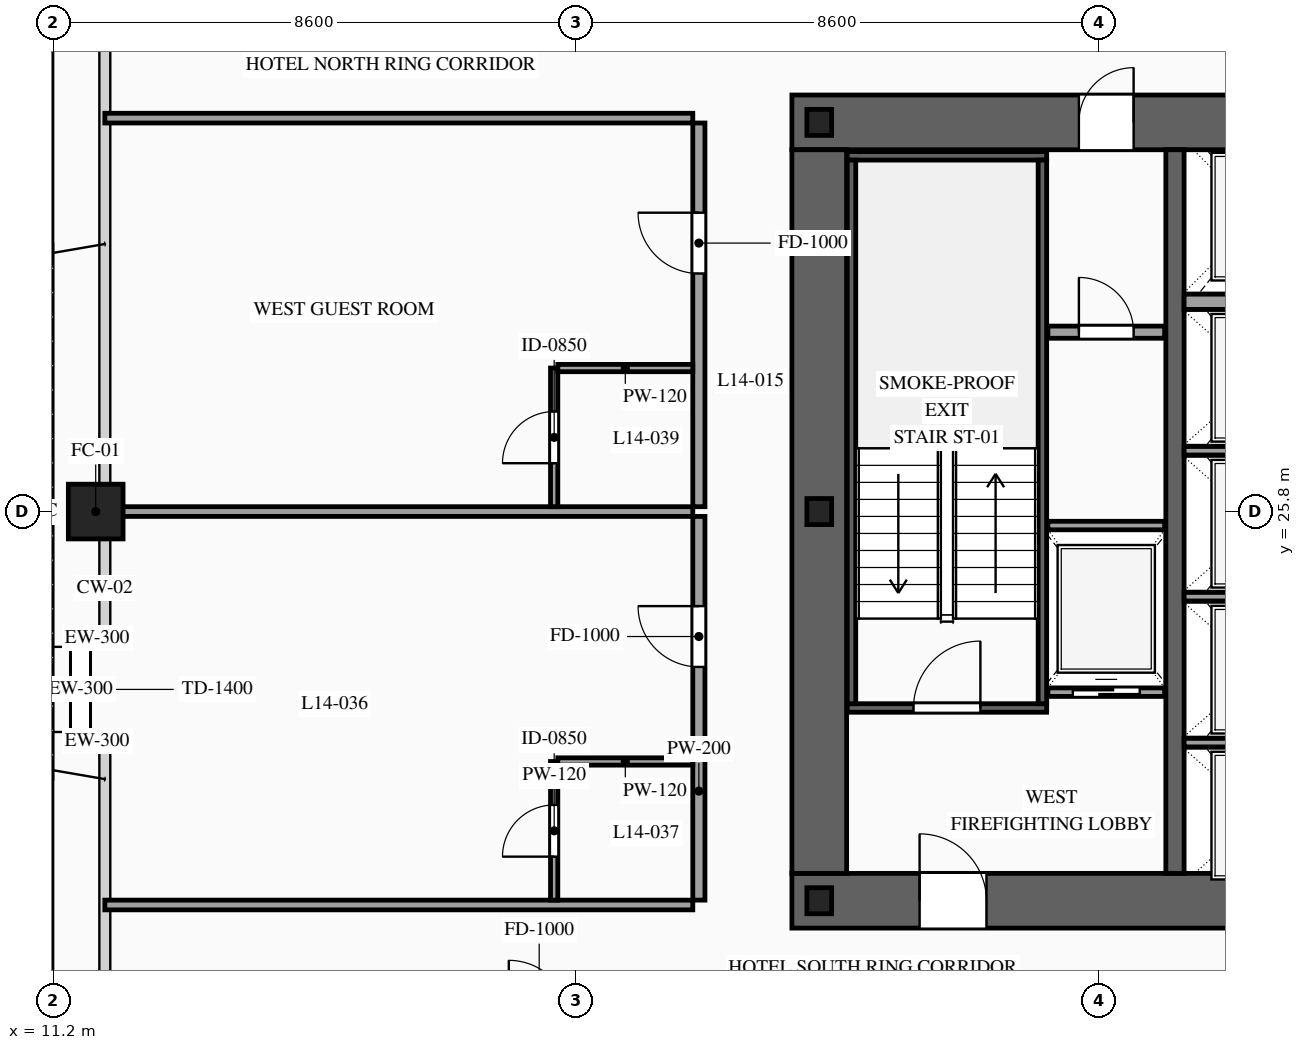
"""IFC4 building model, lengths in metres.
Left out: names, types, materials, properties, quantities, classifications, styles, units other than length and angle.
Written with IfcOpenShell. Run it as: python <this file> out.ifc"""

import sys

from ifc_helpers import new_model, si_unit, direction, frame, frame_2d, origin, origin_2d, place, context, subcontext, project, spatial, rectangle, hollow_rectangle, i_section, extrude, source, transform, mapped, element, fill, save


model = new_model("IFC4")
c1 = context("Model", 3, precision=1e-05, world=origin(), true_north=direction((0.0, 1.0)))
c2 = subcontext(c1, "Body", "Model", "MODEL_VIEW")
j1 = project(units=[si_unit("LENGTHUNIT", "METRE"), si_unit("PLANEANGLEUNIT", "RADIAN")], contexts=[c1])
p1 = place(None, origin())
s1 = spatial("IfcSite", under=j1, at=p1, CompositionType="ELEMENT")
p2 = place(p1, origin())
s2 = spatial("IfcBuilding", under=s1, at=p2, CompositionType="ELEMENT")
p3 = place(p2, frame((0.0, 0.0, 56.8)))
s3 = spatial("IfcBuildingStorey", under=s2, at=p3, CompositionType="ELEMENT", Elevation=56.8)
p4 = place(p3, frame((23.35, 19.4, 0.0), z_axis=(0.0, 0.0, 1.0), x_axis=(1.0, 0.0, 0.0)))
e1 = element("IfcWall", 1, at=p4, inside=s3, PredefinedType="SHEAR", context=c2, shape_type="SweptSolid", body=[
    extrude(rectangle(XDim=27.3, YDim=0.9, at=frame_2d((13.65, 0.0))), origin(), (0.0, 0.0, 1.0), 3.6),
])
p5 = place(p4, frame((2.1, 0.0, 0.0)))
e2 = element("IfcOpeningElement", 2, at=p5, cuts=e1, PredefinedType="OPENING", context=c2, shape_type="SweptSolid", body=[
    extrude(rectangle(XDim=1.1, YDim=2.2, at=frame_2d((0.55, 1.1))), frame((0.0, 0.465, 0.0), z_axis=(0.0, -1.0, 0.0), x_axis=(1.0, 0.0, 0.0)), (0.0, 0.0, 1.0), 0.93),
])
p6 = place(p4, frame((10.0, 0.0, 0.0)))
e3 = element("IfcOpeningElement", 3, at=p6, cuts=e1, PredefinedType="OPENING", context=c2, shape_type="SweptSolid", body=[
    extrude(rectangle(XDim=1.1, YDim=2.2, at=frame_2d((0.55, 1.1))), frame((0.0, 0.465, 0.0), z_axis=(0.0, -1.0, 0.0), x_axis=(1.0, 0.0, 0.0)), (0.0, 0.0, 1.0), 0.93),
])
p7 = place(p4, frame((23.2, 0.0, 0.0)))
e4 = element("IfcOpeningElement", 4, at=p7, cuts=e1, PredefinedType="OPENING", context=c2, shape_type="SweptSolid", body=[
    extrude(rectangle(XDim=1.1, YDim=2.2, at=frame_2d((0.55, 1.1))), frame((0.0, 0.465, 0.0), z_axis=(0.0, -1.0, 0.0), x_axis=(1.0, 0.0, 0.0)), (0.0, 0.0, 1.0), 0.93),
])
p8 = place(p4, frame((19.82, 0.0, 0.0)))
e5 = element("IfcOpeningElement", 5, at=p8, cuts=e1, PredefinedType="OPENING", context=c2, shape_type="SweptSolid", body=[
    extrude(rectangle(XDim=0.9, YDim=2.15, at=frame_2d((0.45, 1.075))), frame((0.0, 0.465, 0.0), z_axis=(0.0, -1.0, 0.0), x_axis=(1.0, 0.0, 0.0)), (0.0, 0.0, 1.0), 0.93),
])
p9 = place(p4, frame((18.38, 0.0, 0.0)))
e6 = element("IfcOpeningElement", 6, at=p9, cuts=e1, PredefinedType="OPENING", context=c2, shape_type="SweptSolid", body=[
    extrude(rectangle(XDim=0.9, YDim=2.15, at=frame_2d((0.45, 1.075))), frame((0.0, 0.465, 0.0), z_axis=(0.0, -1.0, 0.0), x_axis=(1.0, 0.0, 0.0)), (0.0, 0.0, 1.0), 0.93),
])
p10 = place(p3, frame((23.35, 32.2, 0.0), z_axis=(0.0, 0.0, 1.0), x_axis=(1.0, 0.0, 0.0)))
e7 = element("IfcWall", 7, at=p10, inside=s3, PredefinedType="SHEAR", context=c2, shape_type="SweptSolid", body=[
    extrude(rectangle(XDim=27.3, YDim=0.9, at=frame_2d((13.65, 0.0))), origin(), (0.0, 0.0, 1.0), 3.6),
])
p11 = place(p10, frame((4.72, 0.0, 0.0)))
e8 = element("IfcOpeningElement", 8, at=p11, cuts=e7, PredefinedType="OPENING", context=c2, shape_type="SweptSolid", body=[
    extrude(rectangle(XDim=0.9, YDim=2.15, at=frame_2d((0.45, 1.075))), frame((0.0, 0.465, 0.0), z_axis=(0.0, -1.0, 0.0), x_axis=(1.0, 0.0, 0.0)), (0.0, 0.0, 1.0), 0.93),
])
p12 = place(p10, frame((10.0, 0.0, 0.0)))
e9 = element("IfcOpeningElement", 9, at=p12, cuts=e7, PredefinedType="OPENING", context=c2, shape_type="SweptSolid", body=[
    extrude(rectangle(XDim=1.1, YDim=2.2, at=frame_2d((0.55, 1.1))), frame((0.0, 0.465, 0.0), z_axis=(0.0, -1.0, 0.0), x_axis=(1.0, 0.0, 0.0)), (0.0, 0.0, 1.0), 0.93),
])
p13 = place(p10, frame((15.85, 0.0, 0.0)))
e10 = element("IfcOpeningElement", 10, at=p13, cuts=e7, PredefinedType="OPENING", context=c2, shape_type="SweptSolid", body=[
    extrude(rectangle(XDim=1.1, YDim=2.2, at=frame_2d((0.55, 1.1))), frame((0.0, 0.465, 0.0), z_axis=(0.0, -1.0, 0.0), x_axis=(1.0, 0.0, 0.0)), (0.0, 0.0, 1.0), 0.93),
])
p14 = place(p10, frame((19.82, 0.0, 0.0)))
e11 = element("IfcOpeningElement", 11, at=p14, cuts=e7, PredefinedType="OPENING", context=c2, shape_type="SweptSolid", body=[
    extrude(rectangle(XDim=0.9, YDim=2.15, at=frame_2d((0.45, 1.075))), frame((0.0, 0.465, 0.0), z_axis=(0.0, -1.0, 0.0), x_axis=(1.0, 0.0, 0.0)), (0.0, 0.0, 1.0), 0.93),
])
m1 = source(origin(), c2, "Body", "SweptSolid", [
    extrude(rectangle(XDim=11.9, YDim=0.9, at=frame_2d((5.95, 0.0))), origin(), (0.0, 0.0, 1.0), 3.6),
])
p15 = place(p3, frame((23.8, 19.85, 0.0), z_axis=(0.0, 0.0, 1.0), x_axis=(0.0, 1.0, 0.0)))
e12 = element("IfcWall", 12, at=p15, inside=s3, PredefinedType="SHEAR", context=c2, shape_type="MappedRepresentation", body=[
    mapped(m1, transform((0.0, 0.0, 0.0), scale=1.0)),
])
m2 = source(origin(), c2, "Body", "SweptSolid", [
    extrude(rectangle(XDim=11.9, YDim=0.3, at=frame_2d((5.95, 0.0))), origin(), (0.0, 0.0, 1.0), 3.6),
])
p16 = place(p3, frame((29.65, 19.85, 0.0), z_axis=(0.0, 0.0, 1.0), x_axis=(0.0, 1.0, 0.0)))
e13 = element("IfcWall", 13, at=p16, inside=s3, PredefinedType="SOLIDWALL", context=c2, shape_type="MappedRepresentation", body=[
    mapped(m2, transform((0.0, 0.0, 0.0), scale=1.0)),
])
m3 = source(origin(), c2, "Body", "SweptSolid", [
    extrude(i_section(OverallWidth=0.407, OverallDepth=0.428, WebThickness=0.02, FlangeThickness=0.035, at=origin_2d()), origin(), (0.0, 0.0, 1.0), 3.6),
])
for number, where, z_axis, x_axis in (
    (14, (23.8, 19.4, 0.0), (0.0, 0.0, 1.0), (1.0, 0.0, 0.0)),
    (15, (23.8, 25.8, 0.0), (0.0, 0.0, 1.0), (1.0, 0.0, 0.0)),
    (16, (23.8, 32.2, 0.0), (0.0, 0.0, 1.0), (1.0, 0.0, 0.0)),
):
    element("IfcColumn", number, at=place(p3, frame(where, z_axis=z_axis, x_axis=x_axis)), inside=s3, PredefinedType="COLUMN", context=c2, shape_type="MappedRepresentation", body=[
        mapped(m3, transform((0.0, 0.0, 0.0), scale=1.0)),
    ])
m4 = source(origin(), c2, "Body", "SweptSolid", [
    extrude(hollow_rectangle(XDim=0.9, YDim=0.9, WallThickness=0.042, at=origin_2d()), origin(), (0.0, 0.0, 1.0), 3.6),
])
p17 = place(p3, frame((11.9, 25.8, 0.0), z_axis=(0.0, 0.0, 1.0), x_axis=(1.0, 0.0, 0.0)))
e17 = element("IfcColumn", 17, at=p17, inside=s3, PredefinedType="COLUMN", context=c2, shape_type="MappedRepresentation", body=[
    mapped(m4, transform((0.0, 0.0, 0.0), scale=1.0)),
])
p18 = place(p3, frame((11.65, 21.875, 0.0), z_axis=(0.0, 0.0, 1.0), x_axis=(0.0, 1.0, 0.0)))
e18 = element("IfcWall", 18, at=p18, inside=s3, PredefinedType="SOLIDWALL", context=c2, shape_type="SweptSolid", body=[
    extrude(rectangle(XDim=2.0, YDim=0.3, at=frame_2d((1.0, 0.0))), origin(), (0.0, 0.0, 1.0), 3.38),
])
p19 = place(p18, frame((0.3, 0.0, 0.0)))
e19 = element("IfcOpeningElement", 19, at=p19, cuts=e18, PredefinedType="OPENING", context=c2, shape_type="SweptSolid", body=[
    extrude(rectangle(XDim=1.4, YDim=2.3, at=frame_2d((0.7, 1.15))), frame((0.0, 0.165, 0.0), z_axis=(0.0, -1.0, 0.0), x_axis=(1.0, 0.0, 0.0)), (0.0, 0.0, 1.0), 0.33),
])
m5 = source(origin(), c2, "Body", "SweptSolid", [
    extrude(rectangle(XDim=0.25, YDim=0.3, at=frame_2d((0.125, 0.0))), origin(), (0.0, 0.0, 1.0), 3.38),
])
for number, where, z_axis, x_axis in (
    (20, (12.05, 22.025, 0.0), (0.0, 0.0, 1.0), (-1.0, 0.0, 0.0)),
    (21, (11.8, 23.725, 0.0), (0.0, 0.0, 1.0), (1.0, 0.0, 0.0)),
):
    element("IfcWall", number, at=place(p3, frame(where, z_axis=z_axis, x_axis=x_axis)), inside=s3, PredefinedType="SOLIDWALL", context=c2, shape_type="MappedRepresentation", body=[
        mapped(m5, transform((0.0, 0.0, 0.0), scale=1.0)),
    ])
p20 = place(p3, frame((27.56, 22.83, 0.0), z_axis=(0.0, 0.0, 1.0), x_axis=(1.0, 0.0, 0.0)))
e22 = element("IfcWall", 22, at=p20, inside=s3, PredefinedType="SOLIDWALL", context=c2, shape_type="SweptSolid", body=[
    extrude(rectangle(XDim=1.92, YDim=0.14, at=frame_2d((0.96, 0.0))), origin(), (0.0, 0.0, 1.0), 3.38),
])
p21 = place(p20, frame((0.41, 0.0, 0.0)))
e23 = element("IfcOpeningElement", 23, at=p21, cuts=e22, PredefinedType="OPENING", context=c2, shape_type="SweptSolid", body=[
    extrude(rectangle(XDim=1.1, YDim=2.2, at=frame_2d((0.55, 1.1))), frame((0.0, 0.085, 0.0), z_axis=(0.0, -1.0, 0.0), x_axis=(1.0, 0.0, 0.0)), (0.0, 0.0, 1.0), 0.17),
])
m6 = source(origin(), c2, "Body", "SweptSolid", [
    extrude(rectangle(XDim=1.92, YDim=0.14, at=frame_2d((0.96, 0.0))), origin(), (0.0, 0.0, 1.0), 3.38),
])
p22 = place(p3, frame((27.56, 25.57, 0.0), z_axis=(0.0, 0.0, 1.0), x_axis=(1.0, 0.0, 0.0)))
e24 = element("IfcWall", 24, at=p22, inside=s3, PredefinedType="SOLIDWALL", context=c2, shape_type="MappedRepresentation", body=[
    mapped(m6, transform((0.0, 0.0, 0.0), scale=1.0)),
])
m7 = source(origin(), c2, "Body", "SweptSolid", [
    extrude(rectangle(XDim=2.5, YDim=0.14, at=frame_2d((1.25, 0.0))), origin(), (0.0, 0.0, 1.0), 3.38),
])
for number, where, z_axis, x_axis in (
    (25, (29.8, 22.0, 0.0), (0.0, 0.0, 1.0), (1.0, 0.0, 0.0)),
    (26, (29.8, 24.4, 0.0), (0.0, 0.0, 1.0), (1.0, 0.0, 0.0)),
    (27, (29.8, 26.8, 0.0), (0.0, 0.0, 1.0), (1.0, 0.0, 0.0)),
):
    element("IfcWall", number, at=place(p3, frame(where, z_axis=z_axis, x_axis=x_axis)), inside=s3, PredefinedType="SOLIDWALL", context=c2, shape_type="MappedRepresentation", body=[
        mapped(m7, transform((0.0, 0.0, 0.0), scale=1.0)),
    ])
m8 = source(origin(), c2, "Body", "SweptSolid", [
    extrude(rectangle(XDim=2.5, YDim=0.25, at=frame_2d((1.25, 0.0))), origin(), (0.0, 0.0, 1.0), 3.38),
])
p23 = place(p3, frame((29.8, 29.25, 0.0), z_axis=(0.0, 0.0, 1.0), x_axis=(1.0, 0.0, 0.0)))
e28 = element("IfcWall", 28, at=p23, inside=s3, PredefinedType="SOLIDWALL", context=c2, shape_type="MappedRepresentation", body=[
    mapped(m8, transform((0.0, 0.0, 0.0), scale=1.0)),
])
p24 = place(p3, frame((24.26, 22.57, 0.0), z_axis=(0.0, 0.0, 1.0), x_axis=(1.0, 0.0, 0.0)))
e29 = element("IfcWall", 29, at=p24, inside=s3, PredefinedType="SOLIDWALL", context=c2, shape_type="SweptSolid", body=[
    extrude(rectangle(XDim=3.28, YDim=0.14, at=frame_2d((1.64, 0.0))), origin(), (0.0, 0.0, 1.0), 3.38),
])
p25 = place(p24, frame((1.09, 0.0, 0.0)))
e30 = element("IfcOpeningElement", 30, at=p25, cuts=e29, PredefinedType="OPENING", context=c2, shape_type="SweptSolid", body=[
    extrude(rectangle(XDim=1.1, YDim=2.2, at=frame_2d((0.55, 1.1))), frame((0.0, 0.085, 0.0), z_axis=(0.0, -1.0, 0.0), x_axis=(1.0, 0.0, 0.0)), (0.0, 0.0, 1.0), 0.17),
])
m9 = source(origin(), c2, "Body", "SweptSolid", [
    extrude(rectangle(XDim=3.28, YDim=0.14, at=frame_2d((1.64, 0.0))), origin(), (0.0, 0.0, 1.0), 3.38),
])
p26 = place(p3, frame((24.26, 31.65, 0.0), z_axis=(0.0, 0.0, 1.0), x_axis=(1.0, 0.0, 0.0)))
e31 = element("IfcWall", 31, at=p26, inside=s3, PredefinedType="SOLIDWALL", context=c2, shape_type="MappedRepresentation", body=[
    mapped(m9, transform((0.0, 0.0, 0.0), scale=1.0)),
])
m10 = source(origin(), c2, "Body", "SweptSolid", [
    extrude(rectangle(XDim=8.94, YDim=0.14, at=frame_2d((4.47, 0.0))), origin(), (0.0, 0.0, 1.0), 3.38),
])
for number, where, z_axis, x_axis in (
    (32, (24.33, 22.64, 0.0), (0.0, 0.0, 1.0), (0.0, 1.0, 0.0)),
    (33, (27.47, 22.64, 0.0), (0.0, 0.0, 1.0), (0.0, 1.0, 0.0)),
):
    element("IfcWall", number, at=place(p3, frame(where, z_axis=z_axis, x_axis=x_axis)), inside=s3, PredefinedType="SOLIDWALL", context=c2, shape_type="MappedRepresentation", body=[
        mapped(m10, transform((0.0, 0.0, 0.0), scale=1.0)),
    ])
p27 = place(p3, frame((27.56, 28.75, 0.0), z_axis=(0.0, 0.0, 1.0), x_axis=(1.0, 0.0, 0.0)))
e34 = element("IfcWall", 34, at=p27, inside=s3, PredefinedType="PARTITIONING", context=c2, shape_type="SweptSolid", body=[
    extrude(rectangle(XDim=1.92, YDim=0.2, at=frame_2d((0.96, 0.0))), origin(), (0.0, 0.0, 1.0), 3.38),
])
p28 = place(p27, frame((0.51, 0.0, 0.0)))
e35 = element("IfcOpeningElement", 35, at=p28, cuts=e34, PredefinedType="OPENING", context=c2, shape_type="SweptSolid", body=[
    extrude(rectangle(XDim=0.9, YDim=2.15, at=frame_2d((0.45, 1.075))), frame((0.0, 0.115, 0.0), z_axis=(0.0, -1.0, 0.0), x_axis=(1.0, 0.0, 0.0)), (0.0, 0.0, 1.0), 0.23),
])
p29 = place(p3, frame((21.82, 19.41, 0.0), z_axis=(0.0, 0.0, 1.0), x_axis=(0.0, 1.0, 0.0)))
e36 = element("IfcWall", 36, at=p29, inside=s3, PredefinedType="PARTITIONING", context=c2, shape_type="SweptSolid", body=[
    extrude(rectangle(XDim=6.31, YDim=0.2, at=frame_2d((3.155, 0.0))), origin(), (0.0, 0.0, 1.0), 3.38),
])
p30 = place(p29, frame((3.835, 0.0, 0.0)))
e37 = element("IfcOpeningElement", 37, at=p30, cuts=e36, PredefinedType="OPENING", context=c2, shape_type="SweptSolid", body=[
    extrude(rectangle(XDim=1.0, YDim=2.2, at=frame_2d((0.5, 1.1))), frame((0.0, 0.115, 0.0), z_axis=(0.0, -1.0, 0.0), x_axis=(1.0, 0.0, 0.0)), (0.0, 0.0, 1.0), 0.23),
])
m11 = source(origin(), c2, "Body", "SweptSolid", [
    extrude(rectangle(XDim=9.67, YDim=0.16, at=frame_2d((4.835, 0.0))), origin(), (0.0, 0.0, 1.0), 2.575),
])
p31 = place(p3, frame((12.05, 25.8, 0.0), z_axis=(0.0, 0.0, 1.0), x_axis=(1.0, 0.0, 0.0)))
e38 = element("IfcWall", 38, at=p31, inside=s3, PredefinedType="PARTITIONING", context=c2, shape_type="MappedRepresentation", body=[
    mapped(m11, transform((0.0, 0.0, 0.0), scale=1.0)),
])
m12 = source(origin(), c2, "Body", "SweptSolid", [
    extrude(rectangle(XDim=9.67, YDim=0.16, at=frame_2d((4.835, 0.0))), origin(), (0.0, 0.0, 1.0), 2.875),
])
p32 = place(p3, frame((12.05, 19.33, 0.0), z_axis=(0.0, 0.0, 1.0), x_axis=(1.0, 0.0, 0.0)))
e39 = element("IfcWall", 39, at=p32, inside=s3, PredefinedType="PARTITIONING", context=c2, shape_type="MappedRepresentation", body=[
    mapped(m12, transform((0.0, 0.0, 0.0), scale=1.0)),
])
p33 = place(p3, frame((19.44, 19.41, 0.0), z_axis=(0.0, 0.0, 1.0), x_axis=(0.0, 1.0, 0.0)))
e40 = element("IfcWall", 40, at=p33, inside=s3, PredefinedType="PARTITIONING", context=c2, shape_type="SweptSolid", body=[
    extrude(rectangle(XDim=2.28, YDim=0.12, at=frame_2d((1.14, 0.0))), origin(), (0.0, 0.0, 1.0), 3.38),
])
p34 = place(p33, frame((0.715, 0.0, 0.0)))
e41 = element("IfcOpeningElement", 41, at=p34, cuts=e40, PredefinedType="OPENING", context=c2, shape_type="SweptSolid", body=[
    extrude(rectangle(XDim=0.85, YDim=2.1, at=frame_2d((0.425, 1.05))), frame((0.0, 0.075, 0.0), z_axis=(0.0, -1.0, 0.0), x_axis=(1.0, 0.0, 0.0)), (0.0, 0.0, 1.0), 0.15),
])
m13 = source(origin(), c2, "Body", "SweptSolid", [
    extrude(rectangle(XDim=2.22, YDim=0.12, at=frame_2d((1.11, 0.0))), origin(), (0.0, 0.0, 1.0), 3.38),
])
p35 = place(p3, frame((19.5, 21.69, 0.0), z_axis=(0.0, 0.0, 1.0), x_axis=(1.0, 0.0, 0.0)))
e42 = element("IfcWall", 42, at=p35, inside=s3, PredefinedType="PARTITIONING", context=c2, shape_type="MappedRepresentation", body=[
    mapped(m13, transform((0.0, 0.0, 0.0), scale=1.0)),
])
p36 = place(p3, frame((21.82, 25.88, 0.0), z_axis=(0.0, 0.0, 1.0), x_axis=(0.0, 1.0, 0.0)))
e43 = element("IfcWall", 43, at=p36, inside=s3, PredefinedType="PARTITIONING", context=c2, shape_type="SweptSolid", body=[
    extrude(rectangle(XDim=6.31, YDim=0.2, at=frame_2d((3.155, 0.0))), origin(), (0.0, 0.0, 1.0), 3.38),
])
p37 = place(p36, frame((3.835, 0.0, 0.0)))
e44 = element("IfcOpeningElement", 44, at=p37, cuts=e43, PredefinedType="OPENING", context=c2, shape_type="SweptSolid", body=[
    extrude(rectangle(XDim=1.0, YDim=2.2, at=frame_2d((0.5, 1.1))), frame((0.0, 0.115, 0.0), z_axis=(0.0, -1.0, 0.0), x_axis=(1.0, 0.0, 0.0)), (0.0, 0.0, 1.0), 0.23),
])
p38 = place(p3, frame((12.05, 32.27, 0.0), z_axis=(0.0, 0.0, 1.0), x_axis=(1.0, 0.0, 0.0)))
e45 = element("IfcWall", 45, at=p38, inside=s3, PredefinedType="PARTITIONING", context=c2, shape_type="MappedRepresentation", body=[
    mapped(m12, transform((0.0, 0.0, 0.0), scale=1.0)),
])
p39 = place(p3, frame((19.44, 25.88, 0.0), z_axis=(0.0, 0.0, 1.0), x_axis=(0.0, 1.0, 0.0)))
e46 = element("IfcWall", 46, at=p39, inside=s3, PredefinedType="PARTITIONING", context=c2, shape_type="SweptSolid", body=[
    extrude(rectangle(XDim=2.28, YDim=0.12, at=frame_2d((1.14, 0.0))), origin(), (0.0, 0.0, 1.0), 3.38),
])
p40 = place(p39, frame((0.715, 0.0, 0.0)))
e47 = element("IfcOpeningElement", 47, at=p40, cuts=e46, PredefinedType="OPENING", context=c2, shape_type="SweptSolid", body=[
    extrude(rectangle(XDim=0.85, YDim=2.1, at=frame_2d((0.425, 1.05))), frame((0.0, 0.075, 0.0), z_axis=(0.0, -1.0, 0.0), x_axis=(1.0, 0.0, 0.0)), (0.0, 0.0, 1.0), 0.15),
])
p41 = place(p3, frame((19.5, 28.16, 0.0), z_axis=(0.0, 0.0, 1.0), x_axis=(1.0, 0.0, 0.0)))
e48 = element("IfcWall", 48, at=p41, inside=s3, PredefinedType="PARTITIONING", context=c2, shape_type="MappedRepresentation", body=[
    mapped(m13, transform((0.0, 0.0, 0.0), scale=1.0)),
])
m14 = source(origin(), c2, "Body", "SweptSolid", [
    extrude(rectangle(XDim=1.4, YDim=2.3, at=frame_2d((0.7, 1.15))), frame((0.0, 0.025, 0.0), z_axis=(0.0, -1.0, 0.0), x_axis=(1.0, 0.0, 0.0)), (0.0, 0.0, 1.0), 0.05),
])
p42 = place(p19, origin())
e49 = element("IfcDoor", 49, at=p42, inside=s3, OperationType="DOUBLE_DOOR_SINGLE_SWING", PredefinedType="DOOR", context=c2, shape_type="MappedRepresentation", body=[
    mapped(m14, transform((0.0, 0.0, 0.0), scale=1.0)),
])
fill(e19, e49)
m15 = source(origin(), c2, "Body", "SweptSolid", [
    extrude(rectangle(XDim=1.1, YDim=2.2, at=frame_2d((0.55, 1.1))), frame((0.0, 0.025, 0.0), z_axis=(0.0, -1.0, 0.0), x_axis=(1.0, 0.0, 0.0)), (0.0, 0.0, 1.0), 0.05),
])
p43 = place(p21, origin())
e50 = element("IfcDoor", 50, at=p43, inside=s3, OperationType="SLIDING_TO_LEFT", PredefinedType="DOOR", context=c2, shape_type="MappedRepresentation", body=[
    mapped(m15, transform((0.0, 0.0, 0.0), scale=1.0)),
])
fill(e23, e50)
m16 = source(origin(), c2, "Body", "SweptSolid", [
    extrude(rectangle(XDim=1.1, YDim=2.2, at=frame_2d((0.55, 1.1))), frame((0.0, 0.025, 0.0), z_axis=(0.0, -1.0, 0.0), x_axis=(1.0, 0.0, 0.0)), (0.0, 0.0, 1.0), 0.05),
])
p44 = place(p25, origin())
e51 = element("IfcDoor", 51, at=p44, inside=s3, OperationType="SINGLE_SWING_RIGHT", PredefinedType="DOOR", context=c2, shape_type="MappedRepresentation", body=[
    mapped(m16, transform((0.0, 0.0, 0.0), scale=1.0)),
])
fill(e30, e51)
p45 = place(p5, origin())
e52 = element("IfcDoor", 52, at=p45, inside=s3, OperationType="SINGLE_SWING_LEFT", PredefinedType="DOOR", context=c2, shape_type="MappedRepresentation", body=[
    mapped(m16, transform((0.0, 0.0, 0.0), scale=1.0)),
])
fill(e2, e52)
m17 = source(origin(), c2, "Body", "SweptSolid", [
    extrude(rectangle(XDim=0.9, YDim=2.15, at=frame_2d((0.45, 1.075))), frame((0.0, 0.025, 0.0), z_axis=(0.0, -1.0, 0.0), x_axis=(1.0, 0.0, 0.0)), (0.0, 0.0, 1.0), 0.05),
])
p46 = place(p11, origin())
e53 = element("IfcDoor", 53, at=p46, inside=s3, OperationType="SINGLE_SWING_RIGHT", PredefinedType="DOOR", context=c2, shape_type="MappedRepresentation", body=[
    mapped(m17, transform((0.0, 0.0, 0.0), scale=1.0)),
])
fill(e8, e53)
p47 = place(p28, origin())
e54 = element("IfcDoor", 54, at=p47, inside=s3, OperationType="SINGLE_SWING_LEFT", PredefinedType="DOOR", context=c2, shape_type="MappedRepresentation", body=[
    mapped(m17, transform((0.0, 0.0, 0.0), scale=1.0)),
])
fill(e35, e54)
m18 = source(origin(), c2, "Body", "SweptSolid", [
    extrude(rectangle(XDim=1.0, YDim=2.2, at=frame_2d((0.5, 1.1))), frame((0.0, 0.025, 0.0), z_axis=(0.0, -1.0, 0.0), x_axis=(1.0, 0.0, 0.0)), (0.0, 0.0, 1.0), 0.05),
])
p48 = place(p30, origin())
e55 = element("IfcDoor", 55, at=p48, inside=s3, OperationType="SINGLE_SWING_RIGHT", PredefinedType="DOOR", context=c2, shape_type="MappedRepresentation", body=[
    mapped(m18, transform((0.0, 0.0, 0.0), scale=1.0)),
])
fill(e37, e55)
m19 = source(origin(), c2, "Body", "SweptSolid", [
    extrude(rectangle(XDim=0.85, YDim=2.1, at=frame_2d((0.425, 1.05))), frame((0.0, 0.025, 0.0), z_axis=(0.0, -1.0, 0.0), x_axis=(1.0, 0.0, 0.0)), (0.0, 0.0, 1.0), 0.05),
])
p49 = place(p34, origin())
e56 = element("IfcDoor", 56, at=p49, inside=s3, OperationType="SINGLE_SWING_LEFT", PredefinedType="DOOR", context=c2, shape_type="MappedRepresentation", body=[
    mapped(m19, transform((0.0, 0.0, 0.0), scale=1.0)),
])
fill(e41, e56)
p50 = place(p37, origin())
e57 = element("IfcDoor", 57, at=p50, inside=s3, OperationType="SINGLE_SWING_RIGHT", PredefinedType="DOOR", context=c2, shape_type="MappedRepresentation", body=[
    mapped(m18, transform((0.0, 0.0, 0.0), scale=1.0)),
])
fill(e44, e57)
p51 = place(p40, origin())
e58 = element("IfcDoor", 58, at=p51, inside=s3, OperationType="SINGLE_SWING_LEFT", PredefinedType="DOOR", context=c2, shape_type="MappedRepresentation", body=[
    mapped(m19, transform((0.0, 0.0, 0.0), scale=1.0)),
])
fill(e47, e58)
save(model, sys.argv[1])
